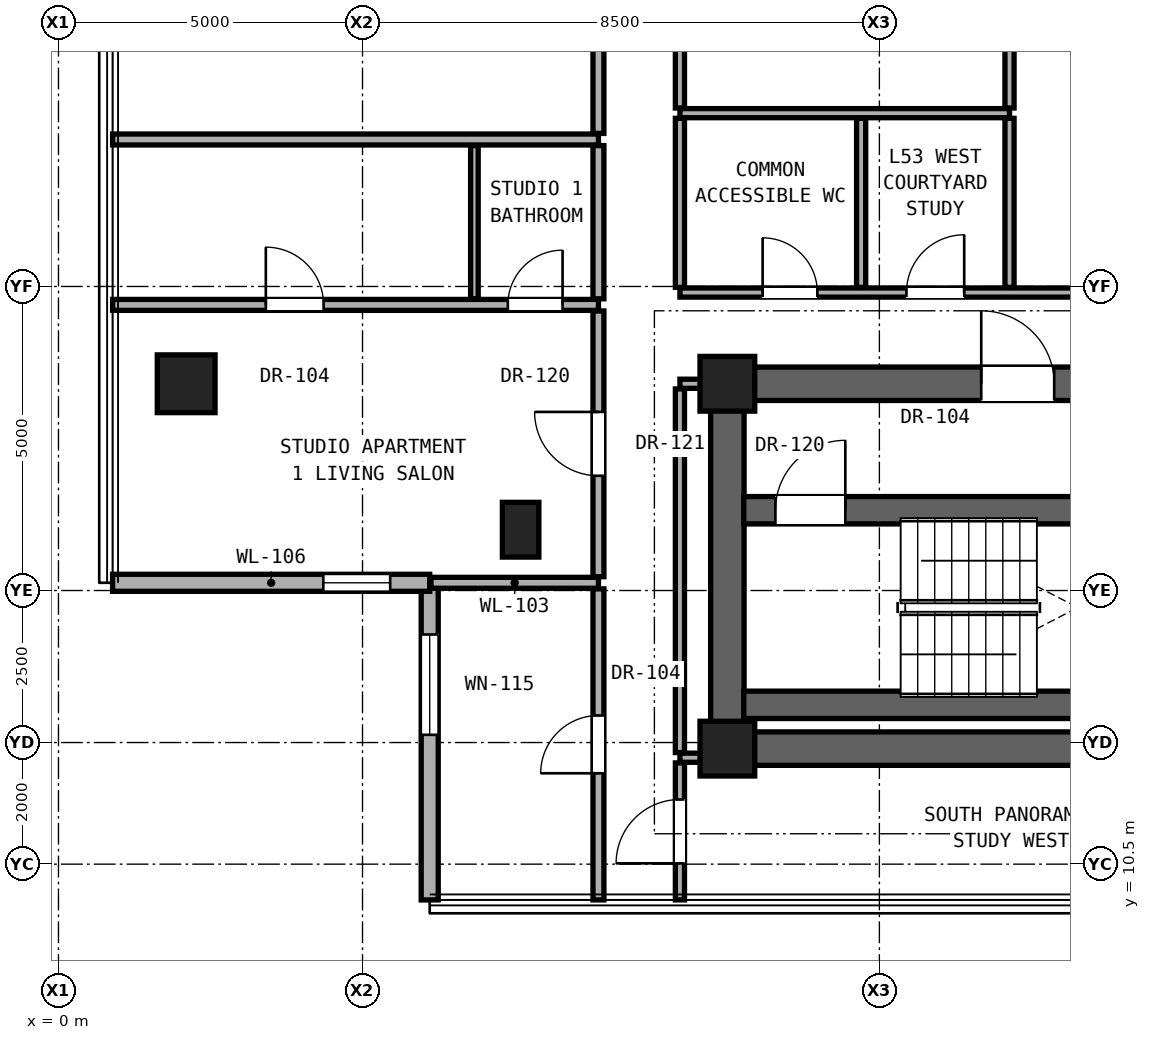
"""IFC4 building model, lengths in metres.
Left out: names, types, materials, properties, quantities, classifications, styles, units other than length and angle.
Written with IfcOpenShell. Run it as: python <this file> out.ifc"""

import sys

from ifc_helpers import new_model, si_unit, direction, frame, frame_2d, origin, origin_2d, place, context, subcontext, project, spatial, rectangle, hollow_rectangle, extrude, element, fill, save


model = new_model("IFC4")
c1 = context("Model", 3, precision=1e-05, world=origin(), true_north=direction((0.0, 1.0)))
c2 = subcontext(c1, "Body", "Model", "MODEL_VIEW")
j1 = project(units=[si_unit("LENGTHUNIT", "METRE"), si_unit("PLANEANGLEUNIT", "RADIAN")], contexts=[c1])
p1 = place(None, origin())
s1 = spatial("IfcSite", under=j1, at=p1, CompositionType="ELEMENT")
p2 = place(p1, origin())
s2 = spatial("IfcBuilding", under=s1, at=p2, CompositionType="ELEMENT")
p3 = place(p2, frame((0.0, 0.0, 186.9)))
s3 = spatial("IfcBuildingStorey", under=s2, at=p3, CompositionType="ELEMENT", Elevation=186.9)
for number, where, z_axis, x_axis in (
    (1, (11.0, 12.4, 0.0), (0.0, 0.0, 1.0), (1.0, 0.0, 0.0)),
    (2, (11.0, 18.4, 0.0), (0.0, 0.0, 1.0), (1.0, 0.0, 0.0)),
):
    element("IfcColumn", number, at=place(p3, frame(where, z_axis=z_axis, x_axis=x_axis)), inside=s3, PredefinedType="COLUMN", context=c2, shape_type="SweptSolid", body=[
        extrude(rectangle(XDim=0.9, YDim=0.9, at=origin_2d()), origin(), (0.0, 0.0, 1.0), 3.25),
    ])
p4 = place(p3, frame((2.1, 18.4, 0.0), z_axis=(0.0, 0.0, 1.0), x_axis=(1.0, 0.0, 0.0)))
e3 = element("IfcColumn", 3, at=p4, inside=s3, PredefinedType="COLUMN", context=c2, shape_type="SweptSolid", body=[
    extrude(hollow_rectangle(XDim=0.95, YDim=0.95, WallThickness=0.05, at=origin_2d()), origin(), (0.0, 0.0, 1.0), 3.25),
])
p5 = place(p3, frame((7.6, 16.0, 0.0), z_axis=(0.0, 0.0, 1.0), x_axis=(1.0, 0.0, 0.0)))
e4 = element("IfcColumn", 4, at=p5, inside=s3, PredefinedType="PILASTER", context=c2, shape_type="SweptSolid", body=[
    extrude(rectangle(XDim=0.6, YDim=0.9, at=origin_2d()), origin(), (0.0, 0.0, 1.0), 3.25),
])
p6 = place(p3, frame((11.0, 12.4, 0.0), z_axis=(0.0, 0.0, 1.0), x_axis=(1.0, 0.0, 0.0)))
e5 = element("IfcWall", 5, at=p6, inside=s3, PredefinedType="SHEAR", context=c2, shape_type="SweptSolid", body=[
    extrude(rectangle(XDim=19.0, YDim=0.55, at=frame_2d((9.5, 0.0))), origin(), (0.0, 0.0, 1.0), 3.05),
])
p7 = place(p3, frame((11.0, 12.4, 0.0), z_axis=(0.0, 0.0, 1.0), x_axis=(0.0, 1.0, 0.0)))
e6 = element("IfcWall", 6, at=p7, inside=s3, PredefinedType="SHEAR", context=c2, shape_type="SweptSolid", body=[
    extrude(rectangle(XDim=6.0, YDim=0.55, at=frame_2d((3.0, 0.0))), origin(), (0.0, 0.0, 1.0), 3.05),
])
p8 = place(p3, frame((11.0, 18.4, 0.0), z_axis=(0.0, 0.0, 1.0), x_axis=(1.0, 0.0, 0.0)))
e7 = element("IfcWall", 7, at=p8, inside=s3, PredefinedType="SHEAR", context=c2, shape_type="SweptSolid", body=[
    extrude(rectangle(XDim=19.0, YDim=0.55, at=frame_2d((9.5, 0.0))), origin(), (0.0, 0.0, 1.0), 3.05),
])
p9 = place(p8, frame((4.175, 0.0, 0.0)))
e8 = element("IfcOpeningElement", 8, at=p9, cuts=e7, PredefinedType="OPENING", context=c2, shape_type="SweptSolid", body=[
    extrude(rectangle(XDim=1.2, YDim=2.25, at=frame_2d((0.6, 1.125))), frame((0.0, 0.285, 0.0), z_axis=(0.0, -1.0, 0.0), x_axis=(1.0, 0.0, 0.0)), (0.0, 0.0, 1.0), 0.57),
])
p10 = place(p8, frame((11.075, 0.0, 0.0)))
e9 = element("IfcOpeningElement", 9, at=p10, cuts=e7, PredefinedType="OPENING", context=c2, shape_type="SweptSolid", body=[
    extrude(rectangle(XDim=0.95, YDim=2.15, at=frame_2d((0.475, 1.075))), frame((0.0, 0.285, 0.0), z_axis=(0.0, -1.0, 0.0), x_axis=(1.0, 0.0, 0.0)), (0.0, 0.0, 1.0), 0.57),
])
p11 = place(p8, frame((14.3, 0.0, 0.0)))
e10 = element("IfcOpeningElement", 10, at=p11, cuts=e7, PredefinedType="OPENING", context=c2, shape_type="SweptSolid", body=[
    extrude(rectangle(XDim=1.3, YDim=2.3, at=frame_2d((0.65, 1.15))), frame((0.0, 0.285, 0.0), z_axis=(0.0, -1.0, 0.0), x_axis=(1.0, 0.0, 0.0)), (0.0, 0.0, 1.0), 0.57),
])
p12 = place(p8, frame((16.6, 0.0, 0.0)))
e11 = element("IfcOpeningElement", 11, at=p12, cuts=e7, PredefinedType="OPENING", context=c2, shape_type="SweptSolid", body=[
    extrude(rectangle(XDim=1.3, YDim=2.3, at=frame_2d((0.65, 1.15))), frame((0.0, 0.285, 0.0), z_axis=(0.0, -1.0, 0.0), x_axis=(1.0, 0.0, 0.0)), (0.0, 0.0, 1.0), 0.57),
])
p13 = place(p3, frame((6.105, 15.127, 0.0), z_axis=(0.0, 0.0, 1.0), x_axis=(0.0, -1.0, 0.0)))
e12 = element("IfcWall", 12, at=p13, inside=s3, PredefinedType="SOLIDWALL", context=c2, shape_type="SweptSolid", body=[
    extrude(rectangle(XDim=5.215, YDim=0.28, at=frame_2d((2.607, 0.0))), origin(), (0.0, 0.0, 1.0), 3.03),
])
p14 = place(p13, frame((0.85, 0.0, 0.68)))
e13 = element("IfcOpeningElement", 13, at=p14, cuts=e12, PredefinedType="OPENING", context=c2, shape_type="SweptSolid", body=[
    extrude(rectangle(XDim=1.65, YDim=2.2, at=frame_2d((0.825, 1.1))), frame((0.0, 0.15, 0.0), z_axis=(0.0, -1.0, 0.0), x_axis=(1.0, 0.0, 0.0)), (0.0, 0.0, 1.0), 0.3),
])
p15 = place(p3, frame((0.89, 15.127, 0.0), z_axis=(0.0, 0.0, 1.0), x_axis=(1.0, 0.0, 0.0)))
e14 = element("IfcWall", 14, at=p15, inside=s3, PredefinedType="SOLIDWALL", context=c2, shape_type="SweptSolid", body=[
    extrude(rectangle(XDim=5.215, YDim=0.28, at=frame_2d((2.607, 0.0))), origin(), (0.0, 0.0, 1.0), 3.03),
])
p16 = place(p15, frame((3.465, 0.0, 0.85)))
e15 = element("IfcOpeningElement", 15, at=p16, cuts=e14, PredefinedType="OPENING", context=c2, shape_type="SweptSolid", body=[
    extrude(rectangle(XDim=1.1, YDim=2.0, at=frame_2d((0.55, 1.0))), frame((0.0, 0.15, 0.0), z_axis=(0.0, -1.0, 0.0), x_axis=(1.0, 0.0, 0.0)), (0.0, 0.0, 1.0), 0.3),
])
p17 = place(p3, frame((10.22, 12.25, 0.0), z_axis=(0.0, 0.0, 1.0), x_axis=(1.0, 0.0, 0.0)))
e16 = element("IfcWall", 16, at=p17, inside=s3, PredefinedType="PARTITIONING", context=c2, shape_type="SweptSolid", body=[
    extrude(rectangle(XDim=0.51, YDim=0.15, at=frame_2d((0.255, 0.0))), origin(), (0.0, 0.0, 1.0), 3.05),
])
p18 = place(p3, frame((11.27, 13.12, 0.0), z_axis=(0.0, 0.0, 1.0), x_axis=(1.0, 0.0, 0.0)))
e17 = element("IfcWall", 17, at=p18, inside=s3, PredefinedType="SHEAR", context=c2, shape_type="SweptSolid", body=[
    extrude(rectangle(XDim=8.46, YDim=0.45, at=frame_2d((4.23, 0.0))), origin(), (0.0, 0.0, 1.0), 3.05),
])
p19 = place(p3, frame((6.125, 15.127, 0.0), z_axis=(0.0, 0.0, 1.0), x_axis=(1.0, 0.0, 0.0)))
e18 = element("IfcWall", 18, at=p19, inside=s3, PredefinedType="PARTITIONING", context=c2, shape_type="SweptSolid", body=[
    extrude(rectangle(XDim=2.755, YDim=0.18, at=frame_2d((1.377, 0.0))), origin(), (0.0, 0.0, 1.0), 3.05),
])
p20 = place(p3, frame((11.27, 16.32, 0.0), z_axis=(0.0, 0.0, 1.0), x_axis=(1.0, 0.0, 0.0)))
e19 = element("IfcWall", 19, at=p20, inside=s3, PredefinedType="SHEAR", context=c2, shape_type="SweptSolid", body=[
    extrude(rectangle(XDim=9.01, YDim=0.45, at=frame_2d((4.505, 0.0))), origin(), (0.0, 0.0, 1.0), 3.05),
])
p21 = place(p20, frame((0.52, 0.0, 0.0)))
e20 = element("IfcOpeningElement", 20, at=p21, cuts=e19, PredefinedType="OPENING", context=c2, shape_type="SweptSolid", body=[
    extrude(rectangle(XDim=1.15, YDim=2.2, at=frame_2d((0.575, 1.1))), frame((0.0, 0.235, 0.0), z_axis=(0.0, -1.0, 0.0), x_axis=(1.0, 0.0, 0.0)), (0.0, 0.0, 1.0), 0.47),
])
p22 = place(p3, frame((10.22, 18.4, 0.0), z_axis=(0.0, 0.0, 1.0), x_axis=(1.0, 0.0, 0.0)))
e21 = element("IfcWall", 21, at=p22, inside=s3, PredefinedType="PARTITIONING", context=c2, shape_type="SweptSolid", body=[
    extrude(rectangle(XDim=0.51, YDim=0.15, at=frame_2d((0.255, 0.0))), origin(), (0.0, 0.0, 1.0), 2.442),
])
p23 = place(p3, frame((0.89, 19.697, 0.0), z_axis=(0.0, 0.0, 1.0), x_axis=(1.0, 0.0, 0.0)))
e22 = element("IfcWall", 22, at=p23, inside=s3, PredefinedType="PARTITIONING", context=c2, shape_type="SweptSolid", body=[
    extrude(rectangle(XDim=7.99, YDim=0.18, at=frame_2d((3.995, 0.0))), origin(), (0.0, 0.0, 1.0), 2.269),
])
p24 = place(p23, frame((2.52, 0.0, 0.0)))
e23 = element("IfcOpeningElement", 23, at=p24, cuts=e22, PredefinedType="OPENING", context=c2, shape_type="SweptSolid", body=[
    extrude(rectangle(XDim=0.95, YDim=2.15, at=frame_2d((0.475, 1.075))), frame((0.0, 0.1, 0.0), z_axis=(0.0, -1.0, 0.0), x_axis=(1.0, 0.0, 0.0)), (0.0, 0.0, 1.0), 0.2),
])
p25 = place(p23, frame((6.5, 0.0, 0.0)))
e24 = element("IfcOpeningElement", 24, at=p25, cuts=e22, PredefinedType="OPENING", context=c2, shape_type="SweptSolid", body=[
    extrude(rectangle(XDim=0.9, YDim=2.1, at=frame_2d((0.45, 1.05))), frame((0.0, 0.1, 0.0), z_axis=(0.0, -1.0, 0.0), x_axis=(1.0, 0.0, 0.0)), (0.0, 0.0, 1.0), 0.2),
])
p26 = place(p3, frame((10.22, 19.9, 0.0), z_axis=(0.0, 0.0, 1.0), x_axis=(1.0, 0.0, 0.0)))
e25 = element("IfcWall", 25, at=p26, inside=s3, PredefinedType="PARTITIONING", context=c2, shape_type="SweptSolid", body=[
    extrude(rectangle(XDim=20.56, YDim=0.15, at=frame_2d((10.28, 0.0))), origin(), (0.0, 0.0, 1.0), 2.186),
])
p27 = place(p26, frame((1.36, 0.0, 0.0)))
e26 = element("IfcOpeningElement", 26, at=p27, cuts=e25, PredefinedType="OPENING", context=c2, shape_type="SweptSolid", body=[
    extrude(rectangle(XDim=0.9, YDim=2.1, at=frame_2d((0.45, 1.05))), frame((0.0, 0.085, 0.0), z_axis=(0.0, -1.0, 0.0), x_axis=(1.0, 0.0, 0.0)), (0.0, 0.0, 1.0), 0.17),
])
p28 = place(p26, frame((3.725, 0.0, 0.0)))
e27 = element("IfcOpeningElement", 27, at=p28, cuts=e25, PredefinedType="OPENING", context=c2, shape_type="SweptSolid", body=[
    extrude(rectangle(XDim=0.95, YDim=2.15, at=frame_2d((0.475, 1.075))), frame((0.0, 0.085, 0.0), z_axis=(0.0, -1.0, 0.0), x_axis=(1.0, 0.0, 0.0)), (0.0, 0.0, 1.0), 0.17),
])
p29 = place(p26, frame((7.417, 0.0, 0.0)))
e28 = element("IfcOpeningElement", 28, at=p29, cuts=e25, PredefinedType="OPENING", context=c2, shape_type="SweptSolid", body=[
    extrude(rectangle(XDim=0.85, YDim=2.01, at=frame_2d((0.425, 1.005))), frame((0.0, 0.085, 0.0), z_axis=(0.0, -1.0, 0.0), x_axis=(1.0, 0.0, 0.0)), (0.0, 0.0, 1.0), 0.17),
])
p30 = place(p3, frame((0.89, 22.417, 0.0), z_axis=(0.0, 0.0, 1.0), x_axis=(1.0, 0.0, 0.0)))
e29 = element("IfcWall", 29, at=p30, inside=s3, PredefinedType="PARTITIONING", context=c2, shape_type="SweptSolid", body=[
    extrude(rectangle(XDim=7.99, YDim=0.18, at=frame_2d((3.995, 0.0))), origin(), (0.0, 0.0, 1.0), 2.269),
])
p31 = place(p3, frame((10.22, 22.85, 0.0), z_axis=(0.0, 0.0, 1.0), x_axis=(1.0, 0.0, 0.0)))
e30 = element("IfcWall", 30, at=p31, inside=s3, PredefinedType="PARTITIONING", context=c2, shape_type="SweptSolid", body=[
    extrude(rectangle(XDim=5.42, YDim=0.15, at=frame_2d((2.71, 0.0))), origin(), (0.0, 0.0, 1.0), 2.186),
])
p32 = place(p3, frame((6.84, 19.797, 0.0), z_axis=(0.0, 0.0, 1.0), x_axis=(0.0, 1.0, 0.0)))
e31 = element("IfcWall", 31, at=p32, inside=s3, PredefinedType="PARTITIONING", context=c2, shape_type="SweptSolid", body=[
    extrude(rectangle(XDim=2.52, YDim=0.125, at=frame_2d((1.26, 0.0))), origin(), (0.0, 0.0, 1.0), 3.05),
])
p33 = place(p3, frame((8.88, 9.912, 0.0), z_axis=(0.0, 0.0, 1.0), x_axis=(0.0, 1.0, 0.0)))
e32 = element("IfcWall", 32, at=p33, inside=s3, PredefinedType="PARTITIONING", context=c2, shape_type="SweptSolid", body=[
    extrude(rectangle(XDim=5.115, YDim=0.18, at=frame_2d((2.558, 0.0))), origin(), (0.0, 0.0, 1.0), 3.05),
])
p34 = place(p33, frame((2.083, 0.0, 0.0)))
e33 = element("IfcOpeningElement", 33, at=p34, cuts=e32, PredefinedType="OPENING", context=c2, shape_type="SweptSolid", body=[
    extrude(rectangle(XDim=0.95, YDim=2.15, at=frame_2d((0.475, 1.075))), frame((0.0, 0.1, 0.0), z_axis=(0.0, -1.0, 0.0), x_axis=(1.0, 0.0, 0.0)), (0.0, 0.0, 1.0), 0.2),
])
p35 = place(p3, frame((8.88, 15.227, 0.0), z_axis=(0.0, 0.0, 1.0), x_axis=(0.0, 1.0, 0.0)))
e34 = element("IfcWall", 34, at=p35, inside=s3, PredefinedType="PARTITIONING", context=c2, shape_type="SweptSolid", body=[
    extrude(rectangle(XDim=4.37, YDim=0.18, at=frame_2d((2.185, 0.0))), origin(), (0.0, 0.0, 1.0), 2.442),
])
p36 = place(p35, frame((1.66, 0.0, 0.0)))
e35 = element("IfcOpeningElement", 35, at=p36, cuts=e34, PredefinedType="OPENING", context=c2, shape_type="SweptSolid", body=[
    extrude(rectangle(XDim=1.05, YDim=2.2, at=frame_2d((0.525, 1.1))), frame((0.0, 0.1, 0.0), z_axis=(0.0, -1.0, 0.0), x_axis=(1.0, 0.0, 0.0)), (0.0, 0.0, 1.0), 0.2),
])
p37 = place(p3, frame((8.88, 19.797, 0.0), z_axis=(0.0, 0.0, 1.0), x_axis=(0.0, 1.0, 0.0)))
e36 = element("IfcWall", 36, at=p37, inside=s3, PredefinedType="PARTITIONING", context=c2, shape_type="SweptSolid", body=[
    extrude(rectangle(XDim=2.52, YDim=0.18, at=frame_2d((1.26, 0.0))), origin(), (0.0, 0.0, 1.0), 3.05),
])
p38 = place(p3, frame((8.88, 22.517, 0.0), z_axis=(0.0, 0.0, 1.0), x_axis=(0.0, 1.0, 0.0)))
e37 = element("IfcWall", 37, at=p38, inside=s3, PredefinedType="PARTITIONING", context=c2, shape_type="SweptSolid", body=[
    extrude(rectangle(XDim=5.002, YDim=0.18, at=frame_2d((2.501, 0.0))), origin(), (0.0, 0.0, 1.0), 2.346),
])
p39 = place(p38, frame((1.976, 0.0, 0.0)))
e38 = element("IfcOpeningElement", 38, at=p39, cuts=e37, PredefinedType="OPENING", context=c2, shape_type="SweptSolid", body=[
    extrude(rectangle(XDim=1.05, YDim=2.2, at=frame_2d((0.525, 1.1))), frame((0.0, 0.1, 0.0), z_axis=(0.0, -1.0, 0.0), x_axis=(1.0, 0.0, 0.0)), (0.0, 0.0, 1.0), 0.2),
])
p40 = place(p3, frame((10.22, 9.912, 0.0), z_axis=(0.0, 0.0, 1.0), x_axis=(0.0, 1.0, 0.0)))
e39 = element("IfcWall", 39, at=p40, inside=s3, PredefinedType="PARTITIONING", context=c2, shape_type="SweptSolid", body=[
    extrude(rectangle(XDim=2.253, YDim=0.15, at=frame_2d((1.126, 0.0))), origin(), (0.0, 0.0, 1.0), 3.05),
])
p41 = place(p40, frame((0.602, 0.0, 0.0)))
e40 = element("IfcOpeningElement", 40, at=p41, cuts=e39, PredefinedType="OPENING", context=c2, shape_type="SweptSolid", body=[
    extrude(rectangle(XDim=1.05, YDim=2.2, at=frame_2d((0.525, 1.1))), frame((0.0, 0.085, 0.0), z_axis=(0.0, -1.0, 0.0), x_axis=(1.0, 0.0, 0.0)), (0.0, 0.0, 1.0), 0.17),
])
p42 = place(p3, frame((10.22, 12.335, 0.0), z_axis=(0.0, 0.0, 1.0), x_axis=(0.0, 1.0, 0.0)))
e41 = element("IfcWall", 41, at=p42, inside=s3, PredefinedType="PARTITIONING", context=c2, shape_type="SweptSolid", body=[
    extrude(rectangle(XDim=5.98, YDim=0.15, at=frame_2d((2.99, 0.0))), origin(), (0.0, 0.0, 1.0), 2.442),
])
p43 = place(p3, frame((10.22, 19.985, 0.0), z_axis=(0.0, 0.0, 1.0), x_axis=(0.0, 1.0, 0.0)))
e42 = element("IfcWall", 42, at=p43, inside=s3, PredefinedType="PARTITIONING", context=c2, shape_type="SweptSolid", body=[
    extrude(rectangle(XDim=2.78, YDim=0.15, at=frame_2d((1.39, 0.0))), origin(), (0.0, 0.0, 1.0), 3.05),
])
p44 = place(p3, frame((10.22, 22.935, 0.0), z_axis=(0.0, 0.0, 1.0), x_axis=(0.0, 1.0, 0.0)))
e43 = element("IfcWall", 43, at=p44, inside=s3, PredefinedType="PARTITIONING", context=c2, shape_type="SweptSolid", body=[
    extrude(rectangle(XDim=10.08, YDim=0.15, at=frame_2d((5.04, 0.0))), origin(), (0.0, 0.0, 1.0), 2.346),
])
p45 = place(p44, frame((4.565, 0.0, 0.0)))
e44 = element("IfcOpeningElement", 44, at=p45, cuts=e43, PredefinedType="OPENING", context=c2, shape_type="SweptSolid", body=[
    extrude(rectangle(XDim=0.95, YDim=2.15, at=frame_2d((0.475, 1.075))), frame((0.0, 0.085, 0.0), z_axis=(0.0, -1.0, 0.0), x_axis=(1.0, 0.0, 0.0)), (0.0, 0.0, 1.0), 0.17),
])
p46 = place(p3, frame((13.2, 19.985, 0.0), z_axis=(0.0, 0.0, 1.0), x_axis=(0.0, 1.0, 0.0)))
e45 = element("IfcWall", 45, at=p46, inside=s3, PredefinedType="PARTITIONING", context=c2, shape_type="SweptSolid", body=[
    extrude(rectangle(XDim=2.78, YDim=0.15, at=frame_2d((1.39, 0.0))), origin(), (0.0, 0.0, 1.0), 3.05),
])
p47 = place(p3, frame((15.64, 19.985, 0.0), z_axis=(0.0, 0.0, 1.0), x_axis=(0.0, 1.0, 0.0)))
e46 = element("IfcWall", 46, at=p47, inside=s3, PredefinedType="PARTITIONING", context=c2, shape_type="SweptSolid", body=[
    extrude(rectangle(XDim=2.78, YDim=0.15, at=frame_2d((1.39, 0.0))), origin(), (0.0, 0.0, 1.0), 2.625),
])
p48 = place(p3, frame((15.64, 22.935, 0.0), z_axis=(0.0, 0.0, 1.0), x_axis=(0.0, 1.0, 0.0)))
e47 = element("IfcWall", 47, at=p48, inside=s3, PredefinedType="PARTITIONING", context=c2, shape_type="SweptSolid", body=[
    extrude(rectangle(XDim=10.08, YDim=0.15, at=frame_2d((5.04, 0.0))), origin(), (0.0, 0.0, 1.0), 2.186),
])
p49 = place(p14, origin())
e48 = element("IfcWindow", 48, at=p49, inside=s3, PartitioningType="SINGLE_PANEL", PredefinedType="WINDOW", context=c2, shape_type="SweptSolid", body=[
    extrude(rectangle(XDim=1.65, YDim=2.2, at=frame_2d((0.825, 1.1))), frame((0.0, 0.03, 0.0), z_axis=(0.0, -1.0, 0.0), x_axis=(1.0, 0.0, 0.0)), (0.0, 0.0, 1.0), 0.06),
])
fill(e13, e48)
p50 = place(p16, origin())
e49 = element("IfcWindow", 49, at=p50, inside=s3, PartitioningType="SINGLE_PANEL", PredefinedType="WINDOW", context=c2, shape_type="SweptSolid", body=[
    extrude(rectangle(XDim=1.1, YDim=2.0, at=frame_2d((0.55, 1.0))), frame((0.0, 0.03, 0.0), z_axis=(0.0, -1.0, 0.0), x_axis=(1.0, 0.0, 0.0)), (0.0, 0.0, 1.0), 0.06),
])
fill(e15, e49)
p51 = place(p9, origin())
e50 = element("IfcDoor", 50, at=p51, inside=s3, OperationType="SINGLE_SWING_LEFT", PredefinedType="DOOR", context=c2, shape_type="SweptSolid", body=[
    extrude(rectangle(XDim=1.2, YDim=2.25, at=frame_2d((0.6, 1.125))), frame((0.0, 0.025, 0.0), z_axis=(0.0, -1.0, 0.0), x_axis=(1.0, 0.0, 0.0)), (0.0, 0.0, 1.0), 0.05),
])
fill(e8, e50)
p52 = place(p21, origin())
e51 = element("IfcDoor", 51, at=p52, inside=s3, OperationType="SINGLE_SWING_RIGHT", PredefinedType="DOOR", context=c2, shape_type="SweptSolid", body=[
    extrude(rectangle(XDim=1.15, YDim=2.2, at=frame_2d((0.575, 1.1))), frame((0.0, 0.025, 0.0), z_axis=(0.0, -1.0, 0.0), x_axis=(1.0, 0.0, 0.0)), (0.0, 0.0, 1.0), 0.05),
])
fill(e20, e51)
p53 = place(p27, origin())
e52 = element("IfcDoor", 52, at=p53, inside=s3, OperationType="SINGLE_SWING_LEFT", PredefinedType="DOOR", context=c2, shape_type="SweptSolid", body=[
    extrude(rectangle(XDim=0.9, YDim=2.1, at=frame_2d((0.45, 1.05))), frame((0.0, 0.025, 0.0), z_axis=(0.0, -1.0, 0.0), x_axis=(1.0, 0.0, 0.0)), (0.0, 0.0, 1.0), 0.05),
])
fill(e26, e52)
p54 = place(p36, origin())
e53 = element("IfcDoor", 53, at=p54, inside=s3, OperationType="SINGLE_SWING_RIGHT", PredefinedType="DOOR", context=c2, shape_type="SweptSolid", body=[
    extrude(rectangle(XDim=1.05, YDim=2.2, at=frame_2d((0.525, 1.1))), frame((0.0, 0.025, 0.0), z_axis=(0.0, -1.0, 0.0), x_axis=(1.0, 0.0, 0.0)), (0.0, 0.0, 1.0), 0.05),
])
fill(e35, e53)
p55 = place(p24, origin())
e54 = element("IfcDoor", 54, at=p55, inside=s3, OperationType="SINGLE_SWING_LEFT", PredefinedType="DOOR", context=c2, shape_type="SweptSolid", body=[
    extrude(rectangle(XDim=0.95, YDim=2.15, at=frame_2d((0.475, 1.075))), frame((0.0, 0.025, 0.0), z_axis=(0.0, -1.0, 0.0), x_axis=(1.0, 0.0, 0.0)), (0.0, 0.0, 1.0), 0.05),
])
fill(e23, e54)
p56 = place(p25, origin())
e55 = element("IfcDoor", 55, at=p56, inside=s3, OperationType="SINGLE_SWING_RIGHT", PredefinedType="DOOR", context=c2, shape_type="SweptSolid", body=[
    extrude(rectangle(XDim=0.9, YDim=2.1, at=frame_2d((0.45, 1.05))), frame((0.0, 0.025, 0.0), z_axis=(0.0, -1.0, 0.0), x_axis=(1.0, 0.0, 0.0)), (0.0, 0.0, 1.0), 0.05),
])
fill(e24, e55)
p57 = place(p28, origin())
e56 = element("IfcDoor", 56, at=p57, inside=s3, OperationType="SINGLE_SWING_RIGHT", PredefinedType="DOOR", context=c2, shape_type="SweptSolid", body=[
    extrude(rectangle(XDim=0.95, YDim=2.15, at=frame_2d((0.475, 1.075))), frame((0.0, 0.025, 0.0), z_axis=(0.0, -1.0, 0.0), x_axis=(1.0, 0.0, 0.0)), (0.0, 0.0, 1.0), 0.05),
])
fill(e27, e56)
p58 = place(p41, origin())
e57 = element("IfcDoor", 57, at=p58, inside=s3, OperationType="SINGLE_SWING_LEFT", PredefinedType="DOOR", context=c2, shape_type="SweptSolid", body=[
    extrude(rectangle(XDim=1.05, YDim=2.2, at=frame_2d((0.525, 1.1))), frame((0.0, 0.025, 0.0), z_axis=(0.0, -1.0, 0.0), x_axis=(1.0, 0.0, 0.0)), (0.0, 0.0, 1.0), 0.05),
])
fill(e40, e57)
p59 = place(p34, origin())
e58 = element("IfcDoor", 58, at=p59, inside=s3, OperationType="SINGLE_SWING_LEFT", PredefinedType="DOOR", context=c2, shape_type="SweptSolid", body=[
    extrude(rectangle(XDim=0.95, YDim=2.15, at=frame_2d((0.475, 1.075))), frame((0.0, 0.025, 0.0), z_axis=(0.0, -1.0, 0.0), x_axis=(1.0, 0.0, 0.0)), (0.0, 0.0, 1.0), 0.05),
])
fill(e33, e58)
save(model, sys.argv[1])
